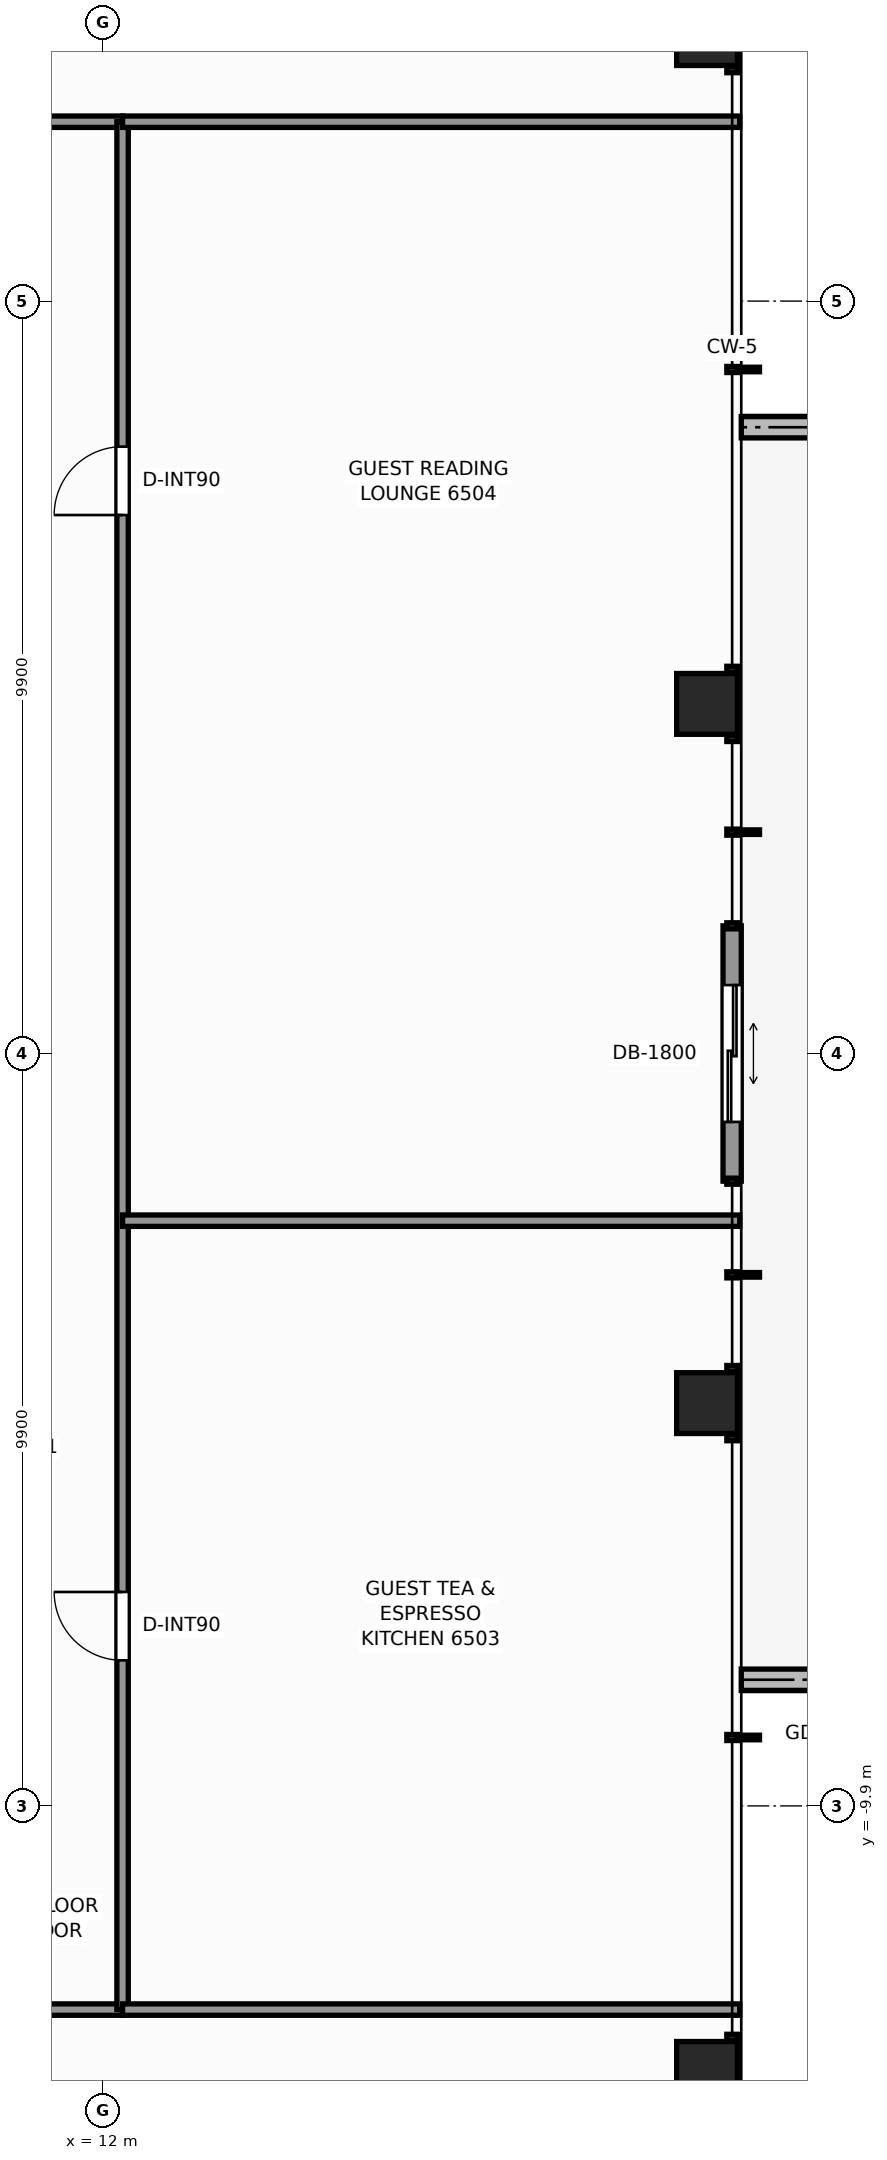
"""IFC4 building model, lengths in metres.
Left out: names, types, materials, properties, quantities, classifications, styles, units other than length and angle.
Written with IfcOpenShell. Run it as: python <this file> out.ifc"""

import sys

from ifc_helpers import new_model, si_unit, direction, frame, frame_2d, origin, origin_2d, place, context, subcontext, project, spatial, rectangle, extrude, element, fill, save


model = new_model("IFC4")
c1 = context("Model", 3, precision=1e-05, world=origin(), true_north=direction((0.0, 1.0)))
c2 = subcontext(c1, "Body", "Model", "MODEL_VIEW")
j1 = project(units=[si_unit("LENGTHUNIT", "METRE"), si_unit("PLANEANGLEUNIT", "RADIAN")], contexts=[c1])
p1 = place(None, origin())
s1 = spatial("IfcSite", under=j1, at=p1, CompositionType="ELEMENT")
p2 = place(p1, origin())
s2 = spatial("IfcBuilding", under=s1, at=p2, CompositionType="ELEMENT")
p3 = place(p2, frame((0.0, 0.0, 222.9)))
s3 = spatial("IfcBuildingStorey", under=s2, at=p3, CompositionType="ELEMENT", Elevation=222.9)
for number, where, z_axis, x_axis in (
    (1, (19.95, -13.4, 0.0), (0.0, 0.0, 1.0), (1.0, 0.0, 0.0)),
    (2, (19.95, -4.6, 0.0), (0.0, 0.0, 1.0), (1.0, 0.0, 0.0)),
    (3, (19.95, 4.6, 0.0), (0.0, 0.0, 1.0), (1.0, 0.0, 0.0)),
    (4, (19.95, 13.4, 0.0), (0.0, 0.0, 1.0), (1.0, 0.0, 0.0)),
):
    element("IfcColumn", number, at=place(p3, frame(where, z_axis=z_axis, x_axis=x_axis)), inside=s3, PredefinedType="COLUMN", context=c2, shape_type="SweptSolid", body=[
        extrude(rectangle(XDim=0.8, YDim=0.8, at=origin_2d()), origin(), (0.0, 0.0, 1.0), 3.3),
    ])
p4 = place(p3, frame((23.767, 8.24, -0.04), z_axis=(0.0, 0.0, 1.0), x_axis=(-1.0, 0.0, 0.0)))
e5 = element("IfcWall", 5, at=p4, inside=s3, PredefinedType="PARAPET", context=c2, shape_type="SweptSolid", body=[
    extrude(rectangle(XDim=3.367, YDim=0.28, at=frame_2d((1.684, 0.0))), origin(), (0.0, 0.0, 1.0), 0.42),
])
p5 = place(p3, frame((20.4, -8.24, -0.04), z_axis=(0.0, 0.0, 1.0), x_axis=(1.0, 0.0, 0.0)))
e6 = element("IfcWall", 6, at=p5, inside=s3, PredefinedType="PARAPET", context=c2, shape_type="SweptSolid", body=[
    extrude(rectangle(XDim=2.34, YDim=0.28, at=frame_2d((1.17, 0.0))), origin(), (0.0, 0.0, 1.0), 0.42),
])
p6 = place(p3, frame((20.28, 1.68, 0.0), z_axis=(0.0, 0.0, 1.0), x_axis=(0.0, -1.0, 0.0)))
e7 = element("IfcWall", 7, at=p6, inside=s3, PredefinedType="STANDARD", context=c2, shape_type="SweptSolid", body=[
    extrude(rectangle(XDim=3.36, YDim=0.24, at=frame_2d((1.68, 0.0))), origin(), (0.0, 0.0, 1.0), 3.08),
])
p7 = place(p6, frame((0.78, 0.0, 0.0)))
e8 = element("IfcOpeningElement", 8, at=p7, cuts=e7, PredefinedType="OPENING", context=c2, shape_type="SweptSolid", body=[
    extrude(rectangle(XDim=1.8, YDim=2.2, at=frame_2d((0.9, 1.1))), frame((0.0, 0.13, 0.0), z_axis=(0.0, -1.0, 0.0), x_axis=(1.0, 0.0, 0.0)), (0.0, 0.0, 1.0), 0.26),
])
p8 = place(p3, frame((-12.26, -12.58, 0.0), z_axis=(0.0, 0.0, 1.0), x_axis=(1.0, 0.0, 0.0)))
e9 = element("IfcWall", 9, at=p8, inside=s3, PredefinedType="PARTITIONING", context=c2, shape_type="SweptSolid", body=[
    extrude(rectangle(XDim=24.52, YDim=0.15, at=frame_2d((12.26, 0.0))), origin(), (0.0, 0.0, 1.0), 2.369),
])
p9 = place(p8, frame((4.275, 0.0, 0.0)))
e10 = element("IfcOpeningElement", 10, at=p9, cuts=e9, PredefinedType="OPENING", context=c2, shape_type="SweptSolid", body=[
    extrude(rectangle(XDim=0.9, YDim=2.06, at=frame_2d((0.45, 1.03))), frame((0.0, 0.085, 0.0), z_axis=(0.0, -1.0, 0.0), x_axis=(1.0, 0.0, 0.0)), (0.0, 0.0, 1.0), 0.17),
])
p10 = place(p8, frame((19.345, 0.0, 0.0)))
e11 = element("IfcOpeningElement", 11, at=p10, cuts=e9, PredefinedType="OPENING", context=c2, shape_type="SweptSolid", body=[
    extrude(rectangle(XDim=0.9, YDim=2.06, at=frame_2d((0.45, 1.03))), frame((0.0, 0.085, 0.0), z_axis=(0.0, -1.0, 0.0), x_axis=(1.0, 0.0, 0.0)), (0.0, 0.0, 1.0), 0.17),
])
p11 = place(p3, frame((-12.26, 12.26, 0.0), z_axis=(0.0, 0.0, 1.0), x_axis=(1.0, 0.0, 0.0)))
e12 = element("IfcWall", 12, at=p11, inside=s3, PredefinedType="PARTITIONING", context=c2, shape_type="SweptSolid", body=[
    extrude(rectangle(XDim=24.52, YDim=0.15, at=frame_2d((12.26, 0.0))), origin(), (0.0, 0.0, 1.0), 2.369),
])
p12 = place(p11, frame((2.916, 0.0, 0.0)))
e13 = element("IfcOpeningElement", 13, at=p12, cuts=e12, PredefinedType="OPENING", context=c2, shape_type="SweptSolid", body=[
    extrude(rectangle(XDim=0.9, YDim=2.06, at=frame_2d((0.45, 1.03))), frame((0.0, 0.085, 0.0), z_axis=(0.0, -1.0, 0.0), x_axis=(1.0, 0.0, 0.0)), (0.0, 0.0, 1.0), 0.17),
])
p13 = place(p11, frame((9.755, 0.0, 0.0)))
e14 = element("IfcOpeningElement", 14, at=p13, cuts=e12, PredefinedType="OPENING", context=c2, shape_type="SweptSolid", body=[
    extrude(rectangle(XDim=0.95, YDim=2.06, at=frame_2d((0.475, 1.03))), frame((0.0, 0.085, 0.0), z_axis=(0.0, -1.0, 0.0), x_axis=(1.0, 0.0, 0.0)), (0.0, 0.0, 1.0), 0.17),
])
p14 = place(p11, frame((19.345, 0.0, 0.0)))
e15 = element("IfcOpeningElement", 15, at=p14, cuts=e12, PredefinedType="OPENING", context=c2, shape_type="SweptSolid", body=[
    extrude(rectangle(XDim=0.9, YDim=2.06, at=frame_2d((0.45, 1.03))), frame((0.0, 0.085, 0.0), z_axis=(0.0, -1.0, 0.0), x_axis=(1.0, 0.0, 0.0)), (0.0, 0.0, 1.0), 0.17),
])
p15 = place(p3, frame((12.26, -12.58, 0.0), z_axis=(0.0, 0.0, 1.0), x_axis=(0.0, 1.0, 0.0)))
e16 = element("IfcWall", 16, at=p15, inside=s3, PredefinedType="PARTITIONING", context=c2, shape_type="SweptSolid", body=[
    extrude(rectangle(XDim=24.84, YDim=0.15, at=frame_2d((12.42, 0.0))), origin(), (0.0, 0.0, 1.0), 2.369),
])
p16 = place(p15, frame((4.595, 0.0, 0.0)))
e17 = element("IfcOpeningElement", 17, at=p16, cuts=e16, PredefinedType="OPENING", context=c2, shape_type="SweptSolid", body=[
    extrude(rectangle(XDim=0.9, YDim=2.06, at=frame_2d((0.45, 1.03))), frame((0.0, 0.085, 0.0), z_axis=(0.0, -1.0, 0.0), x_axis=(1.0, 0.0, 0.0)), (0.0, 0.0, 1.0), 0.17),
])
p17 = place(p15, frame((19.665, 0.0, 0.0)))
e18 = element("IfcOpeningElement", 18, at=p17, cuts=e16, PredefinedType="OPENING", context=c2, shape_type="SweptSolid", body=[
    extrude(rectangle(XDim=0.9, YDim=2.06, at=frame_2d((0.45, 1.03))), frame((0.0, 0.085, 0.0), z_axis=(0.0, -1.0, 0.0), x_axis=(1.0, 0.0, 0.0)), (0.0, 0.0, 1.0), 0.17),
])
for number, where, z_axis, x_axis in (
    (19, (12.26, -12.58, 0.0), (0.0, 0.0, 1.0), (1.0, 0.0, 0.0)),
    (20, (12.26, 12.26, 0.0), (0.0, 0.0, 1.0), (1.0, 0.0, 0.0)),
):
    element("IfcWall", number, at=place(p3, frame(where, z_axis=z_axis, x_axis=x_axis)), inside=s3, PredefinedType="PARTITIONING", context=c2, shape_type="SweptSolid", body=[
        extrude(rectangle(XDim=8.12, YDim=0.15, at=frame_2d((4.06, 0.0))), origin(), (0.0, 0.0, 1.0), 2.369),
    ])
p18 = place(p3, frame((12.26, -2.2, 0.0), z_axis=(0.0, 0.0, 1.0), x_axis=(1.0, 0.0, 0.0)))
e21 = element("IfcWall", 21, at=p18, inside=s3, PredefinedType="PARTITIONING", context=c2, shape_type="SweptSolid", body=[
    extrude(rectangle(XDim=8.12, YDim=0.15, at=frame_2d((4.06, 0.0))), origin(), (0.0, 0.0, 1.0), 2.453),
])
p19 = place(p7, origin())
e22 = element("IfcDoor", 22, at=p19, inside=s3, OperationType="DOUBLE_DOOR_SLIDING", PredefinedType="DOOR", context=c2, shape_type="SweptSolid", body=[
    extrude(rectangle(XDim=1.8, YDim=2.2, at=frame_2d((0.9, 1.1))), frame((0.0, 0.025, 0.0), z_axis=(0.0, -1.0, 0.0), x_axis=(1.0, 0.0, 0.0)), (0.0, 0.0, 1.0), 0.05),
])
fill(e8, e22)
p20 = place(p16, origin())
e23 = element("IfcDoor", 23, at=p20, inside=s3, OperationType="SINGLE_SWING_RIGHT", PredefinedType="DOOR", context=c2, shape_type="SweptSolid", body=[
    extrude(rectangle(XDim=0.9, YDim=2.06, at=frame_2d((0.45, 1.03))), frame((0.0, 0.025, 0.0), z_axis=(0.0, -1.0, 0.0), x_axis=(1.0, 0.0, 0.0)), (0.0, 0.0, 1.0), 0.05),
])
fill(e17, e23)
p21 = place(p17, origin())
e24 = element("IfcDoor", 24, at=p21, inside=s3, OperationType="SINGLE_SWING_LEFT", PredefinedType="DOOR", context=c2, shape_type="SweptSolid", body=[
    extrude(rectangle(XDim=0.9, YDim=2.06, at=frame_2d((0.45, 1.03))), frame((0.0, 0.025, 0.0), z_axis=(0.0, -1.0, 0.0), x_axis=(1.0, 0.0, 0.0)), (0.0, 0.0, 1.0), 0.05),
])
fill(e18, e24)
save(model, sys.argv[1])
